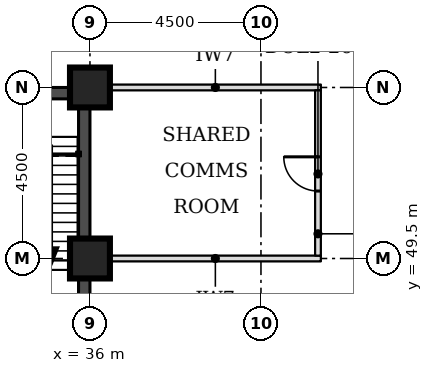
"""IFC4 building model, lengths in metres.
Left out: names, types, materials, properties, quantities, classifications, styles, units other than length and angle.
Written with IfcOpenShell. Run it as: python <this file> out.ifc"""

import sys

from ifc_helpers import new_model, si_unit, direction, frame, frame_2d, origin, origin_2d, place, context, subcontext, project, spatial, rectangle, extrude, element, fill, save


model = new_model("IFC4")
c1 = context("Model", 3, precision=1e-05, world=origin(), true_north=direction((0.0, 1.0)))
c2 = subcontext(c1, "Body", "Model", "MODEL_VIEW")
j1 = project(units=[si_unit("LENGTHUNIT", "METRE"), si_unit("PLANEANGLEUNIT", "RADIAN")], contexts=[c1])
p1 = place(None, origin())
s1 = spatial("IfcSite", under=j1, at=p1, CompositionType="ELEMENT")
p2 = place(p1, origin())
s2 = spatial("IfcBuilding", under=s1, at=p2, CompositionType="ELEMENT")
p3 = place(p2, frame((0.0, 0.0, 86.3)))
s3 = spatial("IfcBuildingStorey", under=s2, at=p3, CompositionType="ELEMENT", Elevation=86.3)
for number, where, z_axis, x_axis in (
    (1, (36.0, 49.5, 0.0), (0.0, 0.0, 1.0), (1.0, 0.0, 0.0)),
    (2, (36.0, 54.0, 0.0), (0.0, 0.0, 1.0), (1.0, 0.0, 0.0)),
):
    element("IfcColumn", number, at=place(p3, frame(where, z_axis=z_axis, x_axis=x_axis)), inside=s3, PredefinedType="COLUMN", context=c2, shape_type="SweptSolid", body=[
        extrude(rectangle(XDim=1.05, YDim=1.05, at=origin_2d()), origin(), (0.0, 0.0, 1.0), 3.7),
    ])
p4 = place(p3, frame((27.3, 53.85, 0.0), z_axis=(0.0, 0.0, 1.0), x_axis=(1.0, 0.0, 0.0)))
e3 = element("IfcWall", 3, at=p4, inside=s3, PredefinedType="SHEAR", context=c2, shape_type="SweptSolid", body=[
    extrude(rectangle(XDim=8.4, YDim=0.3, at=frame_2d((4.2, 0.0))), origin(), (0.0, 0.0, 1.0), 3.7),
])
p5 = place(p4, frame((6.4, 0.0, 0.0)))
e4 = element("IfcOpeningElement", 4, at=p5, cuts=e3, PredefinedType="OPENING", context=c2, shape_type="SweptSolid", body=[
    extrude(rectangle(XDim=1.1, YDim=2.1, at=frame_2d((0.55, 1.05))), frame((0.0, 0.16, 0.0), z_axis=(0.0, -1.0, 0.0), x_axis=(1.0, 0.0, 0.0)), (0.0, 0.0, 1.0), 0.32),
])
p6 = place(p3, frame((35.85, 45.0, 0.0), z_axis=(0.0, 0.0, 1.0), x_axis=(0.0, 1.0, 0.0)))
e5 = element("IfcWall", 5, at=p6, inside=s3, PredefinedType="SHEAR", context=c2, shape_type="SweptSolid", body=[
    extrude(rectangle(XDim=9.0, YDim=0.3, at=frame_2d((4.5, 0.0))), origin(), (0.0, 0.0, 1.0), 3.7),
])
for number, where, z_axis, x_axis in (
    (6, (36.525, 49.5, 0.0), (0.0, 0.0, 1.0), (1.0, 0.0, 0.0)),
    (7, (36.525, 54.0, 0.0), (0.0, 0.0, 1.0), (1.0, 0.0, 0.0)),
):
    element("IfcWall", number, at=place(p3, frame(where, z_axis=z_axis, x_axis=x_axis)), inside=s3, PredefinedType="PARTITIONING", context=c2, shape_type="SweptSolid", body=[
        extrude(rectangle(XDim=5.55, YDim=0.15, at=frame_2d((2.775, 0.0))), origin(), (0.0, 0.0, 1.0), 3.55),
    ])
p7 = place(p3, frame((42.0, 49.575, 0.0), z_axis=(0.0, 0.0, 1.0), x_axis=(0.0, 1.0, 0.0)))
e8 = element("IfcWall", 8, at=p7, inside=s3, PredefinedType="PARTITIONING", context=c2, shape_type="SweptSolid", body=[
    extrude(rectangle(XDim=4.35, YDim=0.15, at=frame_2d((2.175, 0.0))), origin(), (0.0, 0.0, 1.0), 3.55),
])
p8 = place(p7, frame((1.7, 0.0, 0.0)))
e9 = element("IfcOpeningElement", 9, at=p8, cuts=e8, PredefinedType="OPENING", context=c2, shape_type="SweptSolid", body=[
    extrude(rectangle(XDim=0.9, YDim=2.1, at=frame_2d((0.45, 1.05))), frame((0.0, 0.085, 0.0), z_axis=(0.0, -1.0, 0.0), x_axis=(1.0, 0.0, 0.0)), (0.0, 0.0, 1.0), 0.17),
])
p9 = place(p8, origin())
e10 = element("IfcDoor", 10, at=p9, inside=s3, OperationType="SINGLE_SWING_RIGHT", PredefinedType="DOOR", context=c2, shape_type="SweptSolid", body=[
    extrude(rectangle(XDim=0.9, YDim=2.1, at=frame_2d((0.45, 1.05))), frame((0.0, 0.025, 0.0), z_axis=(0.0, -1.0, 0.0), x_axis=(1.0, 0.0, 0.0)), (0.0, 0.0, 1.0), 0.05),
])
fill(e9, e10)
save(model, sys.argv[1])
